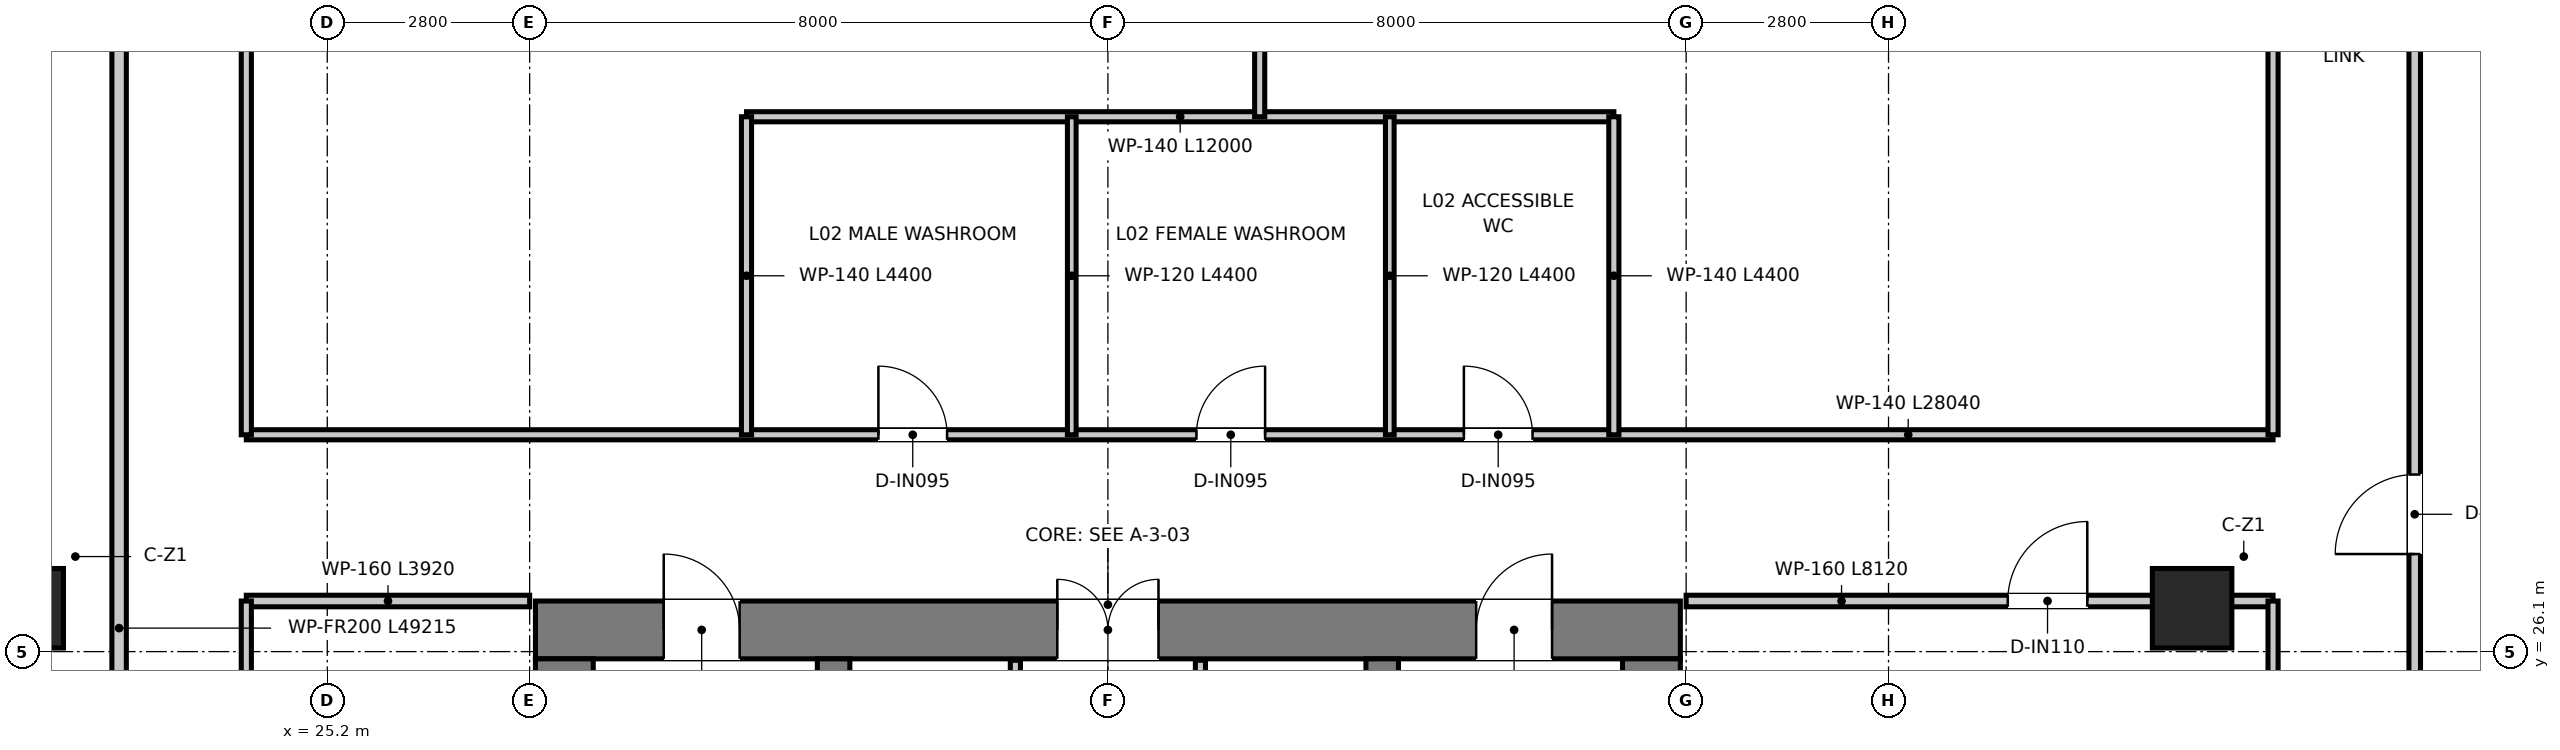
"""IFC4 building model, lengths in metres.
Left out: names, types, materials, properties, quantities, classifications, styles, units other than length and angle.
Written with IfcOpenShell. Run it as: python <this file> out.ifc"""

import sys

from ifc_helpers import new_model, si_unit, direction, frame, frame_2d, origin, origin_2d, place, context, subcontext, project, spatial, rectangle, extrude, source, transform, mapped, element, fill, save


model = new_model("IFC4")
c1 = context("Model", 3, precision=1e-05, world=origin(), true_north=direction((0.0, 1.0)))
c2 = subcontext(c1, "Body", "Model", "MODEL_VIEW")
j1 = project(units=[si_unit("LENGTHUNIT", "METRE"), si_unit("PLANEANGLEUNIT", "RADIAN")], contexts=[c1])
p1 = place(None, origin())
s1 = spatial("IfcSite", under=j1, at=p1, CompositionType="ELEMENT")
p2 = place(p1, origin())
s2 = spatial("IfcBuilding", under=s1, at=p2, CompositionType="ELEMENT")
p3 = place(p2, frame((0.0, 0.0, 10.4)))
s3 = spatial("IfcBuildingStorey", under=s2, at=p3, CompositionType="ELEMENT", Elevation=10.4)
p4 = place(p3, frame((28.08, 26.4, 0.0), z_axis=(0.0, 0.0, 1.0), x_axis=(1.0, 0.0, 0.0)))
e1 = element("IfcWall", 1, at=p4, inside=s3, PredefinedType="SHEAR", context=c2, shape_type="SweptSolid", body=[
    extrude(rectangle(XDim=15.84, YDim=0.8, at=frame_2d((7.92, 0.0))), origin(), (0.0, 0.0, 1.0), 5.0),
])
p5 = place(p4, frame((7.22, 0.0, 0.0)))
e2 = element("IfcOpeningElement", 2, at=p5, cuts=e1, PredefinedType="OPENING", context=c2, shape_type="SweptSolid", body=[
    extrude(rectangle(XDim=1.4, YDim=2.2, at=frame_2d((0.7, 1.1))), frame((0.0, 0.41, 0.0), z_axis=(0.0, -1.0, 0.0), x_axis=(1.0, 0.0, 0.0)), (0.0, 0.0, 1.0), 0.82),
])
p6 = place(p4, frame((1.775, 0.0, 0.0)))
e3 = element("IfcOpeningElement", 3, at=p6, cuts=e1, PredefinedType="OPENING", context=c2, shape_type="SweptSolid", body=[
    extrude(rectangle(XDim=1.05, YDim=2.1, at=frame_2d((0.525, 1.05))), frame((0.0, 0.41, 0.0), z_axis=(0.0, -1.0, 0.0), x_axis=(1.0, 0.0, 0.0)), (0.0, 0.0, 1.0), 0.82),
])
p7 = place(p4, frame((13.015, 0.0, 0.0)))
e4 = element("IfcOpeningElement", 4, at=p7, cuts=e1, PredefinedType="OPENING", context=c2, shape_type="SweptSolid", body=[
    extrude(rectangle(XDim=1.05, YDim=2.1, at=frame_2d((0.525, 1.05))), frame((0.0, 0.41, 0.0), z_axis=(0.0, -1.0, 0.0), x_axis=(1.0, 0.0, 0.0)), (0.0, 0.0, 1.0), 0.82),
])
for number, where, z_axis, x_axis in (
    (5, (28.48, 11.3, 0.0), (0.0, 0.0, 1.0), (0.0, 1.0, 0.0)),
    (6, (43.52, 11.3, 0.0), (0.0, 0.0, 1.0), (0.0, 1.0, 0.0)),
):
    element("IfcWall", number, at=place(p3, frame(where, z_axis=z_axis, x_axis=x_axis)), inside=s3, PredefinedType="SHEAR", context=c2, shape_type="SweptSolid", body=[
        extrude(rectangle(XDim=14.7, YDim=0.8, at=frame_2d((7.35, 0.0))), origin(), (0.0, 0.0, 1.0), 5.0),
    ])
p8 = place(p3, frame((32.205, 13.22, 0.0), z_axis=(0.0, 0.0, 1.0), x_axis=(0.0, 1.0, 0.0)))
e7 = element("IfcWall", 7, at=p8, inside=s3, PredefinedType="SHEAR", context=c2, shape_type="SweptSolid", body=[
    extrude(rectangle(XDim=12.78, YDim=0.45, at=frame_2d((6.39, 0.0))), origin(), (0.0, 0.0, 1.0), 5.0),
])
p9 = place(p8, frame((10.58, 0.0, 0.0)))
e8 = element("IfcOpeningElement", 8, at=p9, cuts=e7, PredefinedType="OPENING", context=c2, shape_type="SweptSolid", body=[
    extrude(rectangle(XDim=1.1, YDim=2.15, at=frame_2d((0.55, 1.075))), frame((0.0, 0.235, 0.0), z_axis=(0.0, -1.0, 0.0), x_axis=(1.0, 0.0, 0.0)), (0.0, 0.0, 1.0), 0.47),
])
p10 = place(p3, frame((39.795, 13.22, 0.0), z_axis=(0.0, 0.0, 1.0), x_axis=(0.0, 1.0, 0.0)))
e9 = element("IfcWall", 9, at=p10, inside=s3, PredefinedType="SHEAR", context=c2, shape_type="SweptSolid", body=[
    extrude(rectangle(XDim=12.78, YDim=0.45, at=frame_2d((6.39, 0.0))), origin(), (0.0, 0.0, 1.0), 5.0),
])
p11 = place(p10, frame((10.58, 0.0, 0.0)))
e10 = element("IfcOpeningElement", 10, at=p11, cuts=e9, PredefinedType="OPENING", context=c2, shape_type="SweptSolid", body=[
    extrude(rectangle(XDim=1.1, YDim=2.15, at=frame_2d((0.55, 1.075))), frame((0.0, 0.235, 0.0), z_axis=(0.0, -1.0, 0.0), x_axis=(1.0, 0.0, 0.0)), (0.0, 0.0, 1.0), 0.47),
])
m1 = source(origin(), c2, "Body", "SweptSolid", [
    extrude(rectangle(XDim=1.1, YDim=1.1, at=origin_2d()), origin(), (0.0, 0.0, 1.0), 5.0),
])
for number, where, z_axis, x_axis in (
    (11, (21.0, 26.7, 0.0), (0.0, 0.0, 1.0), (1.0, 0.0, 0.0)),
    (12, (51.0, 26.7, 0.0), (0.0, 0.0, 1.0), (1.0, 0.0, 0.0)),
):
    element("IfcColumn", number, at=place(p3, frame(where, z_axis=z_axis, x_axis=x_axis)), inside=s3, PredefinedType="COLUMN", context=c2, shape_type="MappedRepresentation", body=[
        mapped(m1, transform((0.0, 0.0, 0.0), x_axis=(1.0, 0.0, 0.0), y_axis=(0.0, 1.0, 0.0), z_axis=(0.0, 0.0, 1.0), scale=1.0)),
    ])
p12 = place(p3, frame((34.72, 20.2, 0.0), z_axis=(0.0, 0.0, 1.0), x_axis=(0.0, 1.0, 0.0)))
e13 = element("IfcWall", 13, at=p12, inside=s3, PredefinedType="PARTITIONING", context=c2, shape_type="SweptSolid", body=[
    extrude(rectangle(XDim=5.78, YDim=0.14, at=frame_2d((2.89, 0.0))), origin(), (0.0, 0.0, 1.0), 3.5),
])
p13 = place(p12, frame((1.05, 0.0, 0.0)))
e14 = element("IfcOpeningElement", 14, at=p13, cuts=e13, PredefinedType="OPENING", context=c2, shape_type="SweptSolid", body=[
    extrude(rectangle(XDim=0.9, YDim=2.1, at=frame_2d((0.45, 1.05))), frame((0.0, 0.08, 0.0), z_axis=(0.0, -1.0, 0.0), x_axis=(1.0, 0.0, 0.0)), (0.0, 0.0, 1.0), 0.16),
])
p14 = place(p3, frame((37.28, 20.2, 0.0), z_axis=(0.0, 0.0, 1.0), x_axis=(0.0, 1.0, 0.0)))
e15 = element("IfcWall", 15, at=p14, inside=s3, PredefinedType="PARTITIONING", context=c2, shape_type="SweptSolid", body=[
    extrude(rectangle(XDim=5.78, YDim=0.14, at=frame_2d((2.89, 0.0))), origin(), (0.0, 0.0, 1.0), 3.5),
])
p15 = place(p14, frame((0.95, 0.0, 0.0)))
e16 = element("IfcOpeningElement", 16, at=p15, cuts=e15, PredefinedType="OPENING", context=c2, shape_type="SweptSolid", body=[
    extrude(rectangle(XDim=1.1, YDim=2.15, at=frame_2d((0.55, 1.075))), frame((0.0, 0.08, 0.0), z_axis=(0.0, -1.0, 0.0), x_axis=(1.0, 0.0, 0.0)), (0.0, 0.0, 1.0), 0.16),
])
p16 = place(p3, frame((24.08, 29.1, 0.0), z_axis=(0.0, 0.0, 1.0), x_axis=(1.0, 0.0, 0.0)))
e17 = element("IfcWall", 17, at=p16, inside=s3, PredefinedType="PARTITIONING", context=c2, shape_type="SweptSolid", body=[
    extrude(rectangle(XDim=28.04, YDim=0.14, at=frame_2d((14.02, 0.0))), origin(), (0.0, 0.0, 1.0), 3.9),
])
p17 = place(p16, frame((8.745, 0.0, 0.0)))
e18 = element("IfcOpeningElement", 18, at=p17, cuts=e17, PredefinedType="OPENING", context=c2, shape_type="SweptSolid", body=[
    extrude(rectangle(XDim=0.95, YDim=2.1, at=frame_2d((0.475, 1.05))), frame((0.0, 0.08, 0.0), z_axis=(0.0, -1.0, 0.0), x_axis=(1.0, 0.0, 0.0)), (0.0, 0.0, 1.0), 0.16),
])
p18 = place(p16, frame((13.145, 0.0, 0.0)))
e19 = element("IfcOpeningElement", 19, at=p18, cuts=e17, PredefinedType="OPENING", context=c2, shape_type="SweptSolid", body=[
    extrude(rectangle(XDim=0.95, YDim=2.1, at=frame_2d((0.475, 1.05))), frame((0.0, 0.08, 0.0), z_axis=(0.0, -1.0, 0.0), x_axis=(1.0, 0.0, 0.0)), (0.0, 0.0, 1.0), 0.16),
])
p19 = place(p16, frame((16.845, 0.0, 0.0)))
e20 = element("IfcOpeningElement", 20, at=p19, cuts=e17, PredefinedType="OPENING", context=c2, shape_type="SweptSolid", body=[
    extrude(rectangle(XDim=0.95, YDim=2.1, at=frame_2d((0.475, 1.05))), frame((0.0, 0.08, 0.0), z_axis=(0.0, -1.0, 0.0), x_axis=(1.0, 0.0, 0.0)), (0.0, 0.0, 1.0), 0.16),
])
p20 = place(p3, frame((22.32, 0.605, 0.0), z_axis=(0.0, 0.0, 1.0), x_axis=(0.0, 1.0, 0.0)))
e21 = element("IfcWall", 21, at=p20, inside=s3, PredefinedType="PARTITIONING", context=c2, shape_type="SweptSolid", body=[
    extrude(rectangle(XDim=49.215, YDim=0.2, at=frame_2d((24.607, 0.0))), origin(), (0.0, 0.0, 1.0), 4.0),
])
p21 = place(p20, frame((41.695, 0.0, 0.0)))
e22 = element("IfcOpeningElement", 22, at=p21, cuts=e21, PredefinedType="OPENING", context=c2, shape_type="SweptSolid", body=[
    extrude(rectangle(XDim=1.4, YDim=2.2, at=frame_2d((0.7, 1.1))), frame((0.0, 0.11, 0.0), z_axis=(0.0, -1.0, 0.0), x_axis=(1.0, 0.0, 0.0)), (0.0, 0.0, 1.0), 0.22),
])
p22 = place(p20, frame((8.845, 0.0, 0.0)))
e23 = element("IfcOpeningElement", 23, at=p22, cuts=e21, PredefinedType="OPENING", context=c2, shape_type="SweptSolid", body=[
    extrude(rectangle(XDim=1.1, YDim=2.15, at=frame_2d((0.55, 1.075))), frame((0.0, 0.11, 0.0), z_axis=(0.0, -1.0, 0.0), x_axis=(1.0, 0.0, 0.0)), (0.0, 0.0, 1.0), 0.22),
])
p23 = place(p3, frame((24.08, 29.1, 0.0), z_axis=(0.0, 0.0, 1.0), x_axis=(0.0, 1.0, 0.0)))
e24 = element("IfcWall", 24, at=p23, inside=s3, PredefinedType="PARTITIONING", context=c2, shape_type="SweptSolid", body=[
    extrude(rectangle(XDim=20.72, YDim=0.14, at=frame_2d((10.36, 0.0))), origin(), (0.0, 0.0, 1.0), 4.0),
])
p24 = place(p23, frame((11.3, 0.0, 0.0)))
e25 = element("IfcOpeningElement", 25, at=p24, cuts=e24, PredefinedType="OPENING", context=c2, shape_type="SweptSolid", body=[
    extrude(rectangle(XDim=1.2, YDim=2.15, at=frame_2d((0.6, 1.075))), frame((0.0, 0.08, 0.0), z_axis=(0.0, -1.0, 0.0), x_axis=(1.0, 0.0, 0.0)), (0.0, 0.0, 1.0), 0.16),
])
p25 = place(p3, frame((52.12, 29.1, 0.0), z_axis=(0.0, 0.0, 1.0), x_axis=(0.0, 1.0, 0.0)))
e26 = element("IfcWall", 26, at=p25, inside=s3, PredefinedType="PARTITIONING", context=c2, shape_type="SweptSolid", body=[
    extrude(rectangle(XDim=20.72, YDim=0.14, at=frame_2d((10.36, 0.0))), origin(), (0.0, 0.0, 1.0), 4.06),
])
p26 = place(p25, frame((11.3, 0.0, 0.0)))
e27 = element("IfcOpeningElement", 27, at=p26, cuts=e26, PredefinedType="OPENING", context=c2, shape_type="SweptSolid", body=[
    extrude(rectangle(XDim=1.2, YDim=2.15, at=frame_2d((0.6, 1.075))), frame((0.0, 0.08, 0.0), z_axis=(0.0, -1.0, 0.0), x_axis=(1.0, 0.0, 0.0)), (0.0, 0.0, 1.0), 0.16),
])
p27 = place(p3, frame((54.08, 0.605, 0.0), z_axis=(0.0, 0.0, 1.0), x_axis=(0.0, 1.0, 0.0)))
e28 = element("IfcWall", 28, at=p27, inside=s3, PredefinedType="PARTITIONING", context=c2, shape_type="SweptSolid", body=[
    extrude(rectangle(XDim=49.215, YDim=0.16, at=frame_2d((24.607, 0.0))), origin(), (0.0, 0.0, 1.0), 4.06),
])
p28 = place(p27, frame((14.845, 0.0, 0.0)))
e29 = element("IfcOpeningElement", 29, at=p28, cuts=e28, PredefinedType="OPENING", context=c2, shape_type="SweptSolid", body=[
    extrude(rectangle(XDim=1.1, YDim=2.15, at=frame_2d((0.55, 1.075))), frame((0.0, 0.09, 0.0), z_axis=(0.0, -1.0, 0.0), x_axis=(1.0, 0.0, 0.0)), (0.0, 0.0, 1.0), 0.18),
])
p29 = place(p27, frame((26.845, 0.0, 0.0)))
e30 = element("IfcOpeningElement", 30, at=p29, cuts=e28, PredefinedType="OPENING", context=c2, shape_type="SweptSolid", body=[
    extrude(rectangle(XDim=1.1, YDim=2.15, at=frame_2d((0.55, 1.075))), frame((0.0, 0.09, 0.0), z_axis=(0.0, -1.0, 0.0), x_axis=(1.0, 0.0, 0.0)), (0.0, 0.0, 1.0), 0.18),
])
p30 = place(p3, frame((31.0, 33.5, 0.0), z_axis=(0.0, 0.0, 1.0), x_axis=(1.0, 0.0, 0.0)))
e31 = element("IfcWall", 31, at=p30, inside=s3, PredefinedType="PARTITIONING", context=c2, shape_type="SweptSolid", body=[
    extrude(rectangle(XDim=12.0, YDim=0.14, at=frame_2d((6.0, 0.0))), origin(), (0.0, 0.0, 1.0), 4.7),
])
for number, where, z_axis, x_axis in (
    (32, (31.0, 29.1, 0.0), (0.0, 0.0, 1.0), (0.0, 1.0, 0.0)),
    (33, (43.0, 29.1, 0.0), (0.0, 0.0, 1.0), (0.0, 1.0, 0.0)),
):
    element("IfcWall", number, at=place(p3, frame(where, z_axis=z_axis, x_axis=x_axis)), inside=s3, PredefinedType="PARTITIONING", context=c2, shape_type="SweptSolid", body=[
        extrude(rectangle(XDim=4.4, YDim=0.14, at=frame_2d((2.2, 0.0))), origin(), (0.0, 0.0, 1.0), 4.15),
    ])
for number, where, z_axis, x_axis in (
    (34, (35.5, 29.1, 0.0), (0.0, 0.0, 1.0), (0.0, 1.0, 0.0)),
    (35, (39.9, 29.1, 0.0), (0.0, 0.0, 1.0), (0.0, 1.0, 0.0)),
):
    element("IfcWall", number, at=place(p3, frame(where, z_axis=z_axis, x_axis=x_axis)), inside=s3, PredefinedType="PARTITIONING", context=c2, shape_type="SweptSolid", body=[
        extrude(rectangle(XDim=4.4, YDim=0.12, at=frame_2d((2.2, 0.0))), origin(), (0.0, 0.0, 1.0), 4.15),
    ])
p31 = place(p3, frame((38.1, 33.5, 0.0), z_axis=(0.0, 0.0, 1.0), x_axis=(0.0, 1.0, 0.0)))
e36 = element("IfcWall", 36, at=p31, inside=s3, PredefinedType="PARTITIONING", context=c2, shape_type="SweptSolid", body=[
    extrude(rectangle(XDim=16.32, YDim=0.14, at=frame_2d((8.16, 0.0))), origin(), (0.0, 0.0, 1.0), 3.9),
])
p32 = place(p3, frame((24.08, 26.8, 0.0), z_axis=(0.0, 0.0, 1.0), x_axis=(1.0, 0.0, 0.0)))
e37 = element("IfcWall", 37, at=p32, inside=s3, PredefinedType="PARTITIONING", context=c2, shape_type="SweptSolid", body=[
    extrude(rectangle(XDim=3.92, YDim=0.16, at=frame_2d((1.96, 0.0))), origin(), (0.0, 0.0, 1.0), 3.9),
])
p33 = place(p3, frame((44.0, 26.8, 0.0), z_axis=(0.0, 0.0, 1.0), x_axis=(1.0, 0.0, 0.0)))
e38 = element("IfcWall", 38, at=p33, inside=s3, PredefinedType="PARTITIONING", context=c2, shape_type="SweptSolid", body=[
    extrude(rectangle(XDim=8.12, YDim=0.16, at=frame_2d((4.06, 0.0))), origin(), (0.0, 0.0, 1.0), 3.9),
])
p34 = place(p33, frame((4.45, 0.0, 0.0)))
e39 = element("IfcOpeningElement", 39, at=p34, cuts=e38, PredefinedType="OPENING", context=c2, shape_type="SweptSolid", body=[
    extrude(rectangle(XDim=1.1, YDim=2.15, at=frame_2d((0.55, 1.075))), frame((0.0, 0.09, 0.0), z_axis=(0.0, -1.0, 0.0), x_axis=(1.0, 0.0, 0.0)), (0.0, 0.0, 1.0), 0.18),
])
p35 = place(p3, frame((24.08, 0.605, 0.0), z_axis=(0.0, 0.0, 1.0), x_axis=(0.0, 1.0, 0.0)))
e40 = element("IfcWall", 40, at=p35, inside=s3, PredefinedType="PARTITIONING", context=c2, shape_type="SweptSolid", body=[
    extrude(rectangle(XDim=26.195, YDim=0.14, at=frame_2d((13.098, 0.0))), origin(), (0.0, 0.0, 1.0), 4.0),
])
p36 = place(p35, frame((19.87, 0.0, 0.0)))
e41 = element("IfcOpeningElement", 41, at=p36, cuts=e40, PredefinedType="OPENING", context=c2, shape_type="SweptSolid", body=[
    extrude(rectangle(XDim=1.05, YDim=2.15, at=frame_2d((0.525, 1.075))), frame((0.0, 0.08, 0.0), z_axis=(0.0, -1.0, 0.0), x_axis=(1.0, 0.0, 0.0)), (0.0, 0.0, 1.0), 0.16),
])
p37 = place(p3, frame((52.12, 0.605, 0.0), z_axis=(0.0, 0.0, 1.0), x_axis=(0.0, 1.0, 0.0)))
e42 = element("IfcWall", 42, at=p37, inside=s3, PredefinedType="PARTITIONING", context=c2, shape_type="SweptSolid", body=[
    extrude(rectangle(XDim=26.195, YDim=0.14, at=frame_2d((13.098, 0.0))), origin(), (0.0, 0.0, 1.0), 4.06),
])
p38 = place(p37, frame((10.67, 0.0, 0.0)))
e43 = element("IfcOpeningElement", 43, at=p38, cuts=e42, PredefinedType="OPENING", context=c2, shape_type="SweptSolid", body=[
    extrude(rectangle(XDim=1.05, YDim=2.15, at=frame_2d((0.525, 1.075))), frame((0.0, 0.08, 0.0), z_axis=(0.0, -1.0, 0.0), x_axis=(1.0, 0.0, 0.0)), (0.0, 0.0, 1.0), 0.16),
])
p39 = place(p5, origin())
e44 = element("IfcDoor", 44, at=p39, inside=s3, OperationType="DOUBLE_DOOR_SINGLE_SWING", PredefinedType="DOOR", context=c2, shape_type="SweptSolid", body=[
    extrude(rectangle(XDim=1.4, YDim=2.2, at=frame_2d((0.7, 1.1))), frame((0.0, 0.025, 0.0), z_axis=(0.0, -1.0, 0.0), x_axis=(1.0, 0.0, 0.0)), (0.0, 0.0, 1.0), 0.05),
])
fill(e2, e44)
p40 = place(p6, origin())
e45 = element("IfcDoor", 45, at=p40, inside=s3, OperationType="SINGLE_SWING_LEFT", PredefinedType="DOOR", context=c2, shape_type="SweptSolid", body=[
    extrude(rectangle(XDim=1.05, YDim=2.1, at=frame_2d((0.525, 1.05))), frame((0.0, 0.025, 0.0), z_axis=(0.0, -1.0, 0.0), x_axis=(1.0, 0.0, 0.0)), (0.0, 0.0, 1.0), 0.05),
])
fill(e3, e45)
p41 = place(p7, origin())
e46 = element("IfcDoor", 46, at=p41, inside=s3, OperationType="SINGLE_SWING_RIGHT", PredefinedType="DOOR", context=c2, shape_type="SweptSolid", body=[
    extrude(rectangle(XDim=1.05, YDim=2.1, at=frame_2d((0.525, 1.05))), frame((0.0, 0.025, 0.0), z_axis=(0.0, -1.0, 0.0), x_axis=(1.0, 0.0, 0.0)), (0.0, 0.0, 1.0), 0.05),
])
fill(e4, e46)
p42 = place(p17, origin())
e47 = element("IfcDoor", 47, at=p42, inside=s3, OperationType="SINGLE_SWING_LEFT", PredefinedType="DOOR", context=c2, shape_type="SweptSolid", body=[
    extrude(rectangle(XDim=0.95, YDim=2.1, at=frame_2d((0.475, 1.05))), frame((0.0, 0.025, 0.0), z_axis=(0.0, -1.0, 0.0), x_axis=(1.0, 0.0, 0.0)), (0.0, 0.0, 1.0), 0.05),
])
fill(e18, e47)
p43 = place(p18, origin())
e48 = element("IfcDoor", 48, at=p43, inside=s3, OperationType="SINGLE_SWING_RIGHT", PredefinedType="DOOR", context=c2, shape_type="SweptSolid", body=[
    extrude(rectangle(XDim=0.95, YDim=2.1, at=frame_2d((0.475, 1.05))), frame((0.0, 0.025, 0.0), z_axis=(0.0, -1.0, 0.0), x_axis=(1.0, 0.0, 0.0)), (0.0, 0.0, 1.0), 0.05),
])
fill(e19, e48)
p44 = place(p19, origin())
e49 = element("IfcDoor", 49, at=p44, inside=s3, OperationType="SINGLE_SWING_LEFT", PredefinedType="DOOR", context=c2, shape_type="SweptSolid", body=[
    extrude(rectangle(XDim=0.95, YDim=2.1, at=frame_2d((0.475, 1.05))), frame((0.0, 0.025, 0.0), z_axis=(0.0, -1.0, 0.0), x_axis=(1.0, 0.0, 0.0)), (0.0, 0.0, 1.0), 0.05),
])
fill(e20, e49)
p45 = place(p34, origin())
e50 = element("IfcDoor", 50, at=p45, inside=s3, OperationType="SINGLE_SWING_RIGHT", PredefinedType="DOOR", context=c2, shape_type="SweptSolid", body=[
    extrude(rectangle(XDim=1.1, YDim=2.15, at=frame_2d((0.55, 1.075))), frame((0.0, 0.025, 0.0), z_axis=(0.0, -1.0, 0.0), x_axis=(1.0, 0.0, 0.0)), (0.0, 0.0, 1.0), 0.05),
])
fill(e39, e50)
p46 = place(p29, origin())
e51 = element("IfcDoor", 51, at=p46, inside=s3, OperationType="SINGLE_SWING_LEFT", PredefinedType="DOOR", context=c2, shape_type="SweptSolid", body=[
    extrude(rectangle(XDim=1.1, YDim=2.15, at=frame_2d((0.55, 1.075))), frame((0.0, 0.025, 0.0), z_axis=(0.0, -1.0, 0.0), x_axis=(1.0, 0.0, 0.0)), (0.0, 0.0, 1.0), 0.05),
])
fill(e30, e51)
save(model, sys.argv[1])
